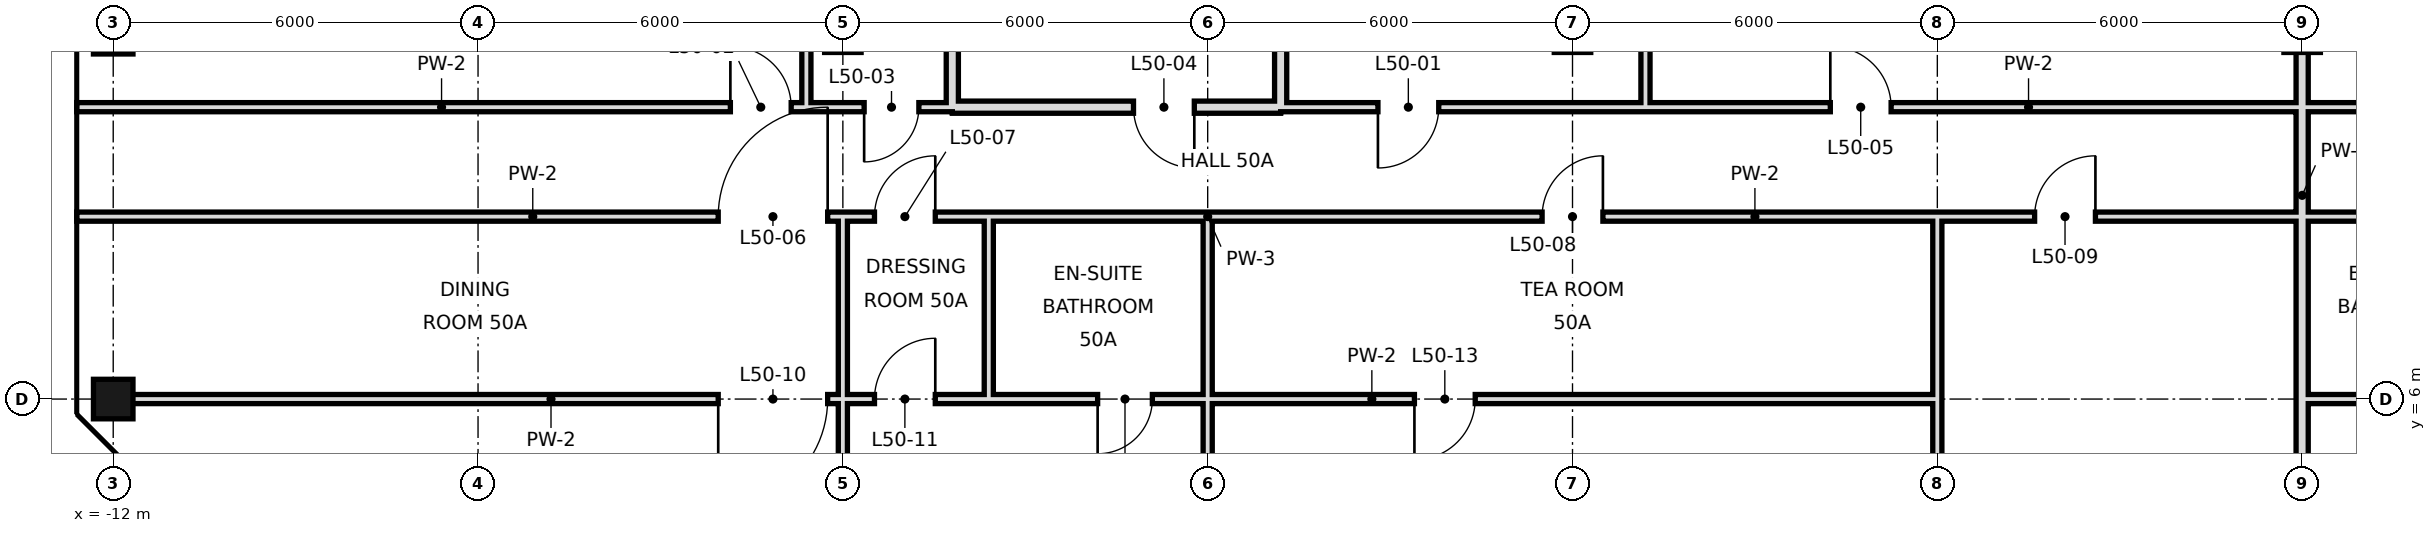
"""IFC4 building model, lengths in metres.
Left out: names, types, materials, properties, quantities, classifications, styles, units other than length and angle.
Written with IfcOpenShell. Run it as: python <this file> out.ifc"""

import sys

from ifc_helpers import new_model, si_unit, direction, frame, frame_2d, origin, origin_2d, place, context, subcontext, project, spatial, rectangle, hollow_rectangle, extrude, element, fill, save


model = new_model("IFC4")
c1 = context("Model", 3, precision=1e-05, world=origin(), true_north=direction((0.0, 1.0)))
c2 = subcontext(c1, "Body", "Model", "MODEL_VIEW")
j1 = project(units=[si_unit("LENGTHUNIT", "METRE"), si_unit("PLANEANGLEUNIT", "RADIAN")], contexts=[c1])
p1 = place(None, origin())
s1 = spatial("IfcSite", under=j1, at=p1, CompositionType="ELEMENT")
p2 = place(p1, origin())
s2 = spatial("IfcBuilding", under=s1, at=p2, CompositionType="ELEMENT")
p3 = place(p2, frame((0.0, 0.0, 215.4)))
s3 = spatial("IfcBuildingStorey", under=s2, at=p3, CompositionType="ELEMENT", Elevation=215.4)
for number, where, z_axis, x_axis in (
    (1, (-12.0, 6.0, 0.0), (0.0, 0.0, 1.0), (1.0, 0.0, 0.0)),
    (2, (-12.0, 12.0, 0.0), (0.0, 0.0, 1.0), (1.0, 0.0, 0.0)),
):
    element("IfcColumn", number, at=place(p3, frame(where, z_axis=z_axis, x_axis=x_axis)), inside=s3, PredefinedType="COLUMN", context=c2, shape_type="SweptSolid", body=[
        extrude(hollow_rectangle(XDim=0.65, YDim=0.65, WallThickness=0.032, at=origin_2d()), origin(), (0.0, 0.0, 1.0), 3.6),
    ])
p4 = place(p3, frame((-0.6, 10.8, 0.0), z_axis=(0.0, 0.0, 1.0), x_axis=(0.0, 1.0, 0.0)))
e3 = element("IfcWall", 3, at=p4, inside=s3, PredefinedType="PARTITIONING", context=c2, shape_type="SweptSolid", body=[
    extrude(rectangle(XDim=7.2, YDim=0.15, at=frame_2d((3.6, 0.0))), origin(), (0.0, 0.0, 1.0), 3.42),
])
p5 = place(p3, frame((0.0, 0.0, 0.0), z_axis=(0.0, 0.0, 1.0), x_axis=(0.0, 1.0, 0.0)))
e4 = element("IfcWall", 4, at=p5, inside=s3, PredefinedType="PARTITIONING", context=c2, shape_type="SweptSolid", body=[
    extrude(rectangle(XDim=9.0, YDim=0.15, at=frame_2d((4.5, 0.0))), origin(), (0.0, 0.0, 1.0), 2.72),
])
p6 = place(p3, frame((1.8, 10.8, 0.0), z_axis=(0.0, 0.0, 1.0), x_axis=(0.0, 1.0, 0.0)))
e5 = element("IfcWall", 5, at=p6, inside=s3, PredefinedType="SOLIDWALL", context=c2, shape_type="SweptSolid", body=[
    extrude(rectangle(XDim=7.2, YDim=0.2, at=frame_2d((3.6, 0.0))), origin(), (0.0, 0.0, 1.0), 3.42),
])
p7 = place(p3, frame((13.2, 10.8, 0.0), z_axis=(0.0, 0.0, 1.0), x_axis=(0.0, 1.0, 0.0)))
e6 = element("IfcWall", 6, at=p7, inside=s3, PredefinedType="PARTITIONING", context=c2, shape_type="SweptSolid", body=[
    extrude(rectangle(XDim=7.9, YDim=0.15, at=frame_2d((3.95, 0.0))), origin(), (0.0, 0.0, 1.0), 3.42),
])
p8 = place(p3, frame((18.0, -0.6, 0.0), z_axis=(0.0, 0.0, 1.0), x_axis=(0.0, 1.0, 0.0)))
e7 = element("IfcWall", 7, at=p8, inside=s3, PredefinedType="PARTITIONING", context=c2, shape_type="SweptSolid", body=[
    extrude(rectangle(XDim=9.6, YDim=0.15, at=frame_2d((4.8, 0.0))), origin(), (0.0, 0.0, 1.0), 2.72),
])
p9 = place(p3, frame((2.4, 6.0, 0.0), z_axis=(0.0, 0.0, 1.0), x_axis=(0.0, 1.0, 0.0)))
e8 = element("IfcWall", 8, at=p9, inside=s3, PredefinedType="PARTITIONING", context=c2, shape_type="SweptSolid", body=[
    extrude(rectangle(XDim=3.0, YDim=0.15, at=frame_2d((1.5, 0.0))), origin(), (0.0, 0.0, 1.0), 3.42),
])
p10 = place(p3, frame((24.0, 0.0, 0.0), z_axis=(0.0, 0.0, 1.0), x_axis=(0.0, 1.0, 0.0)))
e9 = element("IfcWall", 9, at=p10, inside=s3, PredefinedType="SOLIDWALL", context=c2, shape_type="SweptSolid", body=[
    extrude(rectangle(XDim=18.7, YDim=0.2, at=frame_2d((9.35, 0.0))), origin(), (0.0, 0.0, 1.0), 2.72),
])
p11 = place(p3, frame((6.0, -0.6, 0.0), z_axis=(0.0, 0.0, 1.0), x_axis=(0.0, 1.0, 0.0)))
e10 = element("IfcWall", 10, at=p11, inside=s3, PredefinedType="PARTITIONING", context=c2, shape_type="SweptSolid", body=[
    extrude(rectangle(XDim=6.6, YDim=0.15, at=frame_2d((3.3, 0.0))), origin(), (0.0, 0.0, 1.0), 2.72),
])
p12 = place(p3, frame((6.0, 6.0, 0.0), z_axis=(0.0, 0.0, 1.0), x_axis=(0.0, 1.0, 0.0)))
e11 = element("IfcWall", 11, at=p12, inside=s3, PredefinedType="PARTITIONING", context=c2, shape_type="SweptSolid", body=[
    extrude(rectangle(XDim=3.0, YDim=0.15, at=frame_2d((1.5, 0.0))), origin(), (0.0, 0.0, 1.0), 2.72),
])
p13 = place(p3, frame((7.2, 10.8, 0.0), z_axis=(0.0, 0.0, 1.0), x_axis=(0.0, 1.0, 0.0)))
e12 = element("IfcWall", 12, at=p13, inside=s3, PredefinedType="SOLIDWALL", context=c2, shape_type="SweptSolid", body=[
    extrude(rectangle(XDim=7.9, YDim=0.2, at=frame_2d((3.95, 0.0))), origin(), (0.0, 0.0, 1.0), 2.72),
])
p14 = place(p3, frame((1.8, 10.8, 0.0), z_axis=(0.0, 0.0, 1.0), x_axis=(1.0, 0.0, 0.0)))
e13 = element("IfcWall", 13, at=p14, inside=s3, PredefinedType="SOLIDWALL", context=c2, shape_type="SweptSolid", body=[
    extrude(rectangle(XDim=5.4, YDim=0.2, at=frame_2d((2.7, 0.0))), origin(), (0.0, 0.0, 1.0), 2.72),
])
p15 = place(p14, frame((2.98, 0.0, 0.0)))
e14 = element("IfcOpeningElement", 14, at=p15, cuts=e13, PredefinedType="OPENING", context=c2, shape_type="SweptSolid", body=[
    extrude(rectangle(XDim=1.0, YDim=2.4, at=frame_2d((0.5, 1.2))), frame((0.0, 0.11, 0.0), z_axis=(0.0, -1.0, 0.0), x_axis=(1.0, 0.0, 0.0)), (0.0, 0.0, 1.0), 0.22),
])
p16 = place(p3, frame((-12.6, 10.8, 0.0), z_axis=(0.0, 0.0, 1.0), x_axis=(1.0, 0.0, 0.0)))
e15 = element("IfcWall", 15, at=p16, inside=s3, PredefinedType="PARTITIONING", context=c2, shape_type="SweptSolid", body=[
    extrude(rectangle(XDim=12.0, YDim=0.15, at=frame_2d((6.0, 0.0))), origin(), (0.0, 0.0, 1.0), 3.42),
])
p17 = place(p16, frame((10.75, 0.0, 0.0)))
e16 = element("IfcOpeningElement", 16, at=p17, cuts=e15, PredefinedType="OPENING", context=c2, shape_type="SweptSolid", body=[
    extrude(rectangle(XDim=1.0, YDim=2.4, at=frame_2d((0.5, 1.2))), frame((0.0, 0.085, 0.0), z_axis=(0.0, -1.0, 0.0), x_axis=(1.0, 0.0, 0.0)), (0.0, 0.0, 1.0), 0.17),
])
p18 = place(p3, frame((7.2, 10.8, 0.0), z_axis=(0.0, 0.0, 1.0), x_axis=(1.0, 0.0, 0.0)))
e17 = element("IfcWall", 17, at=p18, inside=s3, PredefinedType="PARTITIONING", context=c2, shape_type="SweptSolid", body=[
    extrude(rectangle(XDim=24.6, YDim=0.15, at=frame_2d((12.3, 0.0))), origin(), (0.0, 0.0, 1.0), 3.42),
])
p19 = place(p18, frame((1.6, 0.0, 0.0)))
e18 = element("IfcOpeningElement", 18, at=p19, cuts=e17, PredefinedType="OPENING", context=c2, shape_type="SweptSolid", body=[
    extrude(rectangle(XDim=1.0, YDim=2.4, at=frame_2d((0.5, 1.2))), frame((0.0, 0.085, 0.0), z_axis=(0.0, -1.0, 0.0), x_axis=(1.0, 0.0, 0.0)), (0.0, 0.0, 1.0), 0.17),
])
p20 = place(p18, frame((9.04, 0.0, 0.0)))
e19 = element("IfcOpeningElement", 19, at=p20, cuts=e17, PredefinedType="OPENING", context=c2, shape_type="SweptSolid", body=[
    extrude(rectangle(XDim=1.0, YDim=2.4, at=frame_2d((0.5, 1.2))), frame((0.0, 0.085, 0.0), z_axis=(0.0, -1.0, 0.0), x_axis=(1.0, 0.0, 0.0)), (0.0, 0.0, 1.0), 0.17),
])
p21 = place(p18, frame((21.46, 0.0, 0.0)))
e20 = element("IfcOpeningElement", 20, at=p21, cuts=e17, PredefinedType="OPENING", context=c2, shape_type="SweptSolid", body=[
    extrude(rectangle(XDim=1.0, YDim=2.4, at=frame_2d((0.5, 1.2))), frame((0.0, 0.085, 0.0), z_axis=(0.0, -1.0, 0.0), x_axis=(1.0, 0.0, 0.0)), (0.0, 0.0, 1.0), 0.17),
])
p22 = place(p3, frame((-0.6, 10.8, 0.0), z_axis=(0.0, 0.0, 1.0), x_axis=(1.0, 0.0, 0.0)))
e21 = element("IfcWall", 21, at=p22, inside=s3, PredefinedType="PARTITIONING", context=c2, shape_type="SweptSolid", body=[
    extrude(rectangle(XDim=2.4, YDim=0.15, at=frame_2d((1.2, 0.0))), origin(), (0.0, 0.0, 1.0), 3.42),
])
p23 = place(p22, frame((0.95, 0.0, 0.0)))
e22 = element("IfcOpeningElement", 22, at=p23, cuts=e21, PredefinedType="OPENING", context=c2, shape_type="SweptSolid", body=[
    extrude(rectangle(XDim=0.9, YDim=2.4, at=frame_2d((0.45, 1.2))), frame((0.0, 0.085, 0.0), z_axis=(0.0, -1.0, 0.0), x_axis=(1.0, 0.0, 0.0)), (0.0, 0.0, 1.0), 0.17),
])
p24 = place(p3, frame((-12.0, 6.0, 0.0), z_axis=(0.0, 0.0, 1.0), x_axis=(1.0, 0.0, 0.0)))
e23 = element("IfcWall", 23, at=p24, inside=s3, PredefinedType="PARTITIONING", context=c2, shape_type="SweptSolid", body=[
    extrude(rectangle(XDim=14.4, YDim=0.15, at=frame_2d((7.2, 0.0))), origin(), (0.0, 0.0, 1.0), 2.72),
])
p25 = place(p24, frame((9.95, 0.0, 0.0)))
e24 = element("IfcOpeningElement", 24, at=p25, cuts=e23, PredefinedType="OPENING", context=c2, shape_type="SweptSolid", body=[
    extrude(rectangle(XDim=1.8, YDim=2.4, at=frame_2d((0.9, 1.2))), frame((0.0, 0.085, 0.0), z_axis=(0.0, -1.0, 0.0), x_axis=(1.0, 0.0, 0.0)), (0.0, 0.0, 1.0), 0.17),
])
p26 = place(p24, frame((12.52, 0.0, 0.0)))
e25 = element("IfcOpeningElement", 25, at=p26, cuts=e23, PredefinedType="OPENING", context=c2, shape_type="SweptSolid", body=[
    extrude(rectangle(XDim=1.0, YDim=2.4, at=frame_2d((0.5, 1.2))), frame((0.0, 0.085, 0.0), z_axis=(0.0, -1.0, 0.0), x_axis=(1.0, 0.0, 0.0)), (0.0, 0.0, 1.0), 0.17),
])
p27 = place(p3, frame((6.0, 6.0, 0.0), z_axis=(0.0, 0.0, 1.0), x_axis=(1.0, 0.0, 0.0)))
e26 = element("IfcWall", 26, at=p27, inside=s3, PredefinedType="PARTITIONING", context=c2, shape_type="SweptSolid", body=[
    extrude(rectangle(XDim=12.0, YDim=0.15, at=frame_2d((6.0, 0.0))), origin(), (0.0, 0.0, 1.0), 2.97),
])
p28 = place(p27, frame((3.4, 0.0, 0.0)))
e27 = element("IfcOpeningElement", 27, at=p28, cuts=e26, PredefinedType="OPENING", context=c2, shape_type="SweptSolid", body=[
    extrude(rectangle(XDim=1.0, YDim=2.4, at=frame_2d((0.5, 1.2))), frame((0.0, 0.085, 0.0), z_axis=(0.0, -1.0, 0.0), x_axis=(1.0, 0.0, 0.0)), (0.0, 0.0, 1.0), 0.17),
])
p29 = place(p3, frame((2.4, 6.0, 0.0), z_axis=(0.0, 0.0, 1.0), x_axis=(1.0, 0.0, 0.0)))
e28 = element("IfcWall", 28, at=p29, inside=s3, PredefinedType="PARTITIONING", context=c2, shape_type="SweptSolid", body=[
    extrude(rectangle(XDim=3.6, YDim=0.15, at=frame_2d((1.8, 0.0))), origin(), (0.0, 0.0, 1.0), 2.97),
])
p30 = place(p29, frame((1.79, 0.0, 0.0)))
e29 = element("IfcOpeningElement", 29, at=p30, cuts=e28, PredefinedType="OPENING", context=c2, shape_type="SweptSolid", body=[
    extrude(rectangle(XDim=0.9, YDim=2.4, at=frame_2d((0.45, 1.2))), frame((0.0, 0.085, 0.0), z_axis=(0.0, -1.0, 0.0), x_axis=(1.0, 0.0, 0.0)), (0.0, 0.0, 1.0), 0.17),
])
p31 = place(p3, frame((24.0, 6.0, 0.0), z_axis=(0.0, 0.0, 1.0), x_axis=(1.0, 0.0, 0.0)))
e30 = element("IfcWall", 30, at=p31, inside=s3, PredefinedType="PARTITIONING", context=c2, shape_type="SweptSolid", body=[
    extrude(rectangle(XDim=3.0, YDim=0.15, at=frame_2d((1.5, 0.0))), origin(), (0.0, 0.0, 1.0), 2.97),
])
p32 = place(p31, frame((1.85, 0.0, 0.0)))
e31 = element("IfcOpeningElement", 31, at=p32, cuts=e30, PredefinedType="OPENING", context=c2, shape_type="SweptSolid", body=[
    extrude(rectangle(XDim=0.9, YDim=2.4, at=frame_2d((0.45, 1.2))), frame((0.0, 0.085, 0.0), z_axis=(0.0, -1.0, 0.0), x_axis=(1.0, 0.0, 0.0)), (0.0, 0.0, 1.0), 0.17),
])
p33 = place(p3, frame((-12.6, 9.0, 0.0), z_axis=(0.0, 0.0, 1.0), x_axis=(1.0, 0.0, 0.0)))
e32 = element("IfcWall", 32, at=p33, inside=s3, PredefinedType="PARTITIONING", context=c2, shape_type="SweptSolid", body=[
    extrude(rectangle(XDim=15.0, YDim=0.15, at=frame_2d((7.5, 0.0))), origin(), (0.0, 0.0, 1.0), 3.42),
])
p34 = place(p33, frame((10.55, 0.0, 0.0)))
e33 = element("IfcOpeningElement", 33, at=p34, cuts=e32, PredefinedType="OPENING", context=c2, shape_type="SweptSolid", body=[
    extrude(rectangle(XDim=1.8, YDim=2.4, at=frame_2d((0.9, 1.2))), frame((0.0, 0.085, 0.0), z_axis=(0.0, -1.0, 0.0), x_axis=(1.0, 0.0, 0.0)), (0.0, 0.0, 1.0), 0.17),
])
p35 = place(p33, frame((13.12, 0.0, 0.0)))
e34 = element("IfcOpeningElement", 34, at=p35, cuts=e32, PredefinedType="OPENING", context=c2, shape_type="SweptSolid", body=[
    extrude(rectangle(XDim=1.0, YDim=2.4, at=frame_2d((0.5, 1.2))), frame((0.0, 0.085, 0.0), z_axis=(0.0, -1.0, 0.0), x_axis=(1.0, 0.0, 0.0)), (0.0, 0.0, 1.0), 0.17),
])
p36 = place(p3, frame((6.0, 9.0, 0.0), z_axis=(0.0, 0.0, 1.0), x_axis=(1.0, 0.0, 0.0)))
e35 = element("IfcWall", 35, at=p36, inside=s3, PredefinedType="PARTITIONING", context=c2, shape_type="SweptSolid", body=[
    extrude(rectangle(XDim=18.0, YDim=0.15, at=frame_2d((9.0, 0.0))), origin(), (0.0, 0.0, 1.0), 3.42),
])
p37 = place(p36, frame((5.5, 0.0, 0.0)))
e36 = element("IfcOpeningElement", 36, at=p37, cuts=e35, PredefinedType="OPENING", context=c2, shape_type="SweptSolid", body=[
    extrude(rectangle(XDim=1.0, YDim=2.4, at=frame_2d((0.5, 1.2))), frame((0.0, 0.085, 0.0), z_axis=(0.0, -1.0, 0.0), x_axis=(1.0, 0.0, 0.0)), (0.0, 0.0, 1.0), 0.17),
])
p38 = place(p36, frame((13.6, 0.0, 0.0)))
e37 = element("IfcOpeningElement", 37, at=p38, cuts=e35, PredefinedType="OPENING", context=c2, shape_type="SweptSolid", body=[
    extrude(rectangle(XDim=1.0, YDim=2.4, at=frame_2d((0.5, 1.2))), frame((0.0, 0.085, 0.0), z_axis=(0.0, -1.0, 0.0), x_axis=(1.0, 0.0, 0.0)), (0.0, 0.0, 1.0), 0.17),
])
p39 = place(p3, frame((2.4, 9.0, 0.0), z_axis=(0.0, 0.0, 1.0), x_axis=(1.0, 0.0, 0.0)))
e38 = element("IfcWall", 38, at=p39, inside=s3, PredefinedType="PARTITIONING", context=c2, shape_type="SweptSolid", body=[
    extrude(rectangle(XDim=3.6, YDim=0.15, at=frame_2d((1.8, 0.0))), origin(), (0.0, 0.0, 1.0), 3.42),
])
p40 = place(p3, frame((24.0, 9.0, 0.0), z_axis=(0.0, 0.0, 1.0), x_axis=(1.0, 0.0, 0.0)))
e39 = element("IfcWall", 39, at=p40, inside=s3, PredefinedType="PARTITIONING", context=c2, shape_type="SweptSolid", body=[
    extrude(rectangle(XDim=3.0, YDim=0.15, at=frame_2d((1.5, 0.0))), origin(), (0.0, 0.0, 1.0), 3.42),
])
p41 = place(p19, frame((1.0, 0.0, 0.0), z_axis=(0.0, 0.0, 1.0), x_axis=(-1.0, 0.0, 0.0)))
e40 = element("IfcDoor", 40, at=p41, inside=s3, OperationType="SINGLE_SWING_RIGHT", PredefinedType="DOOR", context=c2, shape_type="SweptSolid", body=[
    extrude(rectangle(XDim=1.0, YDim=2.4, at=frame_2d((0.5, 1.2))), frame((0.0, 0.025, 0.0), z_axis=(0.0, -1.0, 0.0), x_axis=(1.0, 0.0, 0.0)), (0.0, 0.0, 1.0), 0.05),
])
fill(e18, e40)
p42 = place(p17, origin())
e41 = element("IfcDoor", 41, at=p42, inside=s3, OperationType="SINGLE_SWING_LEFT", PredefinedType="DOOR", context=c2, shape_type="SweptSolid", body=[
    extrude(rectangle(XDim=1.0, YDim=2.4, at=frame_2d((0.5, 1.2))), frame((0.0, 0.025, 0.0), z_axis=(0.0, -1.0, 0.0), x_axis=(1.0, 0.0, 0.0)), (0.0, 0.0, 1.0), 0.05),
])
fill(e16, e41)
p43 = place(p23, frame((0.9, 0.0, 0.0), z_axis=(0.0, 0.0, 1.0), x_axis=(-1.0, 0.0, 0.0)))
e42 = element("IfcDoor", 42, at=p43, inside=s3, OperationType="SINGLE_SWING_RIGHT", PredefinedType="DOOR", context=c2, shape_type="SweptSolid", body=[
    extrude(rectangle(XDim=0.9, YDim=2.4, at=frame_2d((0.45, 1.2))), frame((0.0, 0.025, 0.0), z_axis=(0.0, -1.0, 0.0), x_axis=(1.0, 0.0, 0.0)), (0.0, 0.0, 1.0), 0.05),
])
fill(e22, e42)
p44 = place(p15, origin())
e43 = element("IfcDoor", 43, at=p44, inside=s3, OperationType="SINGLE_SWING_RIGHT", PredefinedType="DOOR", context=c2, shape_type="SweptSolid", body=[
    extrude(rectangle(XDim=1.0, YDim=2.4, at=frame_2d((0.5, 1.2))), frame((0.0, 0.025, 0.0), z_axis=(0.0, -1.0, 0.0), x_axis=(1.0, 0.0, 0.0)), (0.0, 0.0, 1.0), 0.05),
])
fill(e14, e43)
p45 = place(p20, origin())
e44 = element("IfcDoor", 44, at=p45, inside=s3, OperationType="SINGLE_SWING_LEFT", PredefinedType="DOOR", context=c2, shape_type="SweptSolid", body=[
    extrude(rectangle(XDim=1.0, YDim=2.4, at=frame_2d((0.5, 1.2))), frame((0.0, 0.025, 0.0), z_axis=(0.0, -1.0, 0.0), x_axis=(1.0, 0.0, 0.0)), (0.0, 0.0, 1.0), 0.05),
])
fill(e19, e44)
p46 = place(p34, frame((1.8, 0.0, 0.0), z_axis=(0.0, 0.0, 1.0), x_axis=(-1.0, 0.0, 0.0)))
e45 = element("IfcDoor", 45, at=p46, inside=s3, OperationType="SINGLE_SWING_LEFT", PredefinedType="DOOR", context=c2, shape_type="SweptSolid", body=[
    extrude(rectangle(XDim=1.8, YDim=2.4, at=frame_2d((0.9, 1.2))), frame((0.0, 0.025, 0.0), z_axis=(0.0, -1.0, 0.0), x_axis=(1.0, 0.0, 0.0)), (0.0, 0.0, 1.0), 0.05),
])
fill(e33, e45)
p47 = place(p35, frame((1.0, 0.0, 0.0), z_axis=(0.0, 0.0, 1.0), x_axis=(-1.0, 0.0, 0.0)))
e46 = element("IfcDoor", 46, at=p47, inside=s3, OperationType="SINGLE_SWING_LEFT", PredefinedType="DOOR", context=c2, shape_type="SweptSolid", body=[
    extrude(rectangle(XDim=1.0, YDim=2.4, at=frame_2d((0.5, 1.2))), frame((0.0, 0.025, 0.0), z_axis=(0.0, -1.0, 0.0), x_axis=(1.0, 0.0, 0.0)), (0.0, 0.0, 1.0), 0.05),
])
fill(e34, e46)
p48 = place(p37, frame((1.0, 0.0, 0.0), z_axis=(0.0, 0.0, 1.0), x_axis=(-1.0, 0.0, 0.0)))
e47 = element("IfcDoor", 47, at=p48, inside=s3, OperationType="SINGLE_SWING_LEFT", PredefinedType="DOOR", context=c2, shape_type="SweptSolid", body=[
    extrude(rectangle(XDim=1.0, YDim=2.4, at=frame_2d((0.5, 1.2))), frame((0.0, 0.025, 0.0), z_axis=(0.0, -1.0, 0.0), x_axis=(1.0, 0.0, 0.0)), (0.0, 0.0, 1.0), 0.05),
])
fill(e36, e47)
p49 = place(p38, frame((1.0, 0.0, 0.0), z_axis=(0.0, 0.0, 1.0), x_axis=(-1.0, 0.0, 0.0)))
e48 = element("IfcDoor", 48, at=p49, inside=s3, OperationType="SINGLE_SWING_LEFT", PredefinedType="DOOR", context=c2, shape_type="SweptSolid", body=[
    extrude(rectangle(XDim=1.0, YDim=2.4, at=frame_2d((0.5, 1.2))), frame((0.0, 0.025, 0.0), z_axis=(0.0, -1.0, 0.0), x_axis=(1.0, 0.0, 0.0)), (0.0, 0.0, 1.0), 0.05),
])
fill(e37, e48)
p50 = place(p25, frame((1.8, 0.0, 0.0), z_axis=(0.0, 0.0, 1.0), x_axis=(-1.0, 0.0, 0.0)))
e49 = element("IfcDoor", 49, at=p50, inside=s3, OperationType="SINGLE_SWING_RIGHT", PredefinedType="DOOR", context=c2, shape_type="SweptSolid", body=[
    extrude(rectangle(XDim=1.8, YDim=2.4, at=frame_2d((0.9, 1.2))), frame((0.0, 0.025, 0.0), z_axis=(0.0, -1.0, 0.0), x_axis=(1.0, 0.0, 0.0)), (0.0, 0.0, 1.0), 0.05),
])
fill(e24, e49)
p51 = place(p26, frame((1.0, 0.0, 0.0), z_axis=(0.0, 0.0, 1.0), x_axis=(-1.0, 0.0, 0.0)))
e50 = element("IfcDoor", 50, at=p51, inside=s3, OperationType="SINGLE_SWING_LEFT", PredefinedType="DOOR", context=c2, shape_type="SweptSolid", body=[
    extrude(rectangle(XDim=1.0, YDim=2.4, at=frame_2d((0.5, 1.2))), frame((0.0, 0.025, 0.0), z_axis=(0.0, -1.0, 0.0), x_axis=(1.0, 0.0, 0.0)), (0.0, 0.0, 1.0), 0.05),
])
fill(e25, e50)
p52 = place(p30, frame((0.9, 0.0, 0.0), z_axis=(0.0, 0.0, 1.0), x_axis=(-1.0, 0.0, 0.0)))
e51 = element("IfcDoor", 51, at=p52, inside=s3, OperationType="SINGLE_SWING_RIGHT", PredefinedType="DOOR", context=c2, shape_type="SweptSolid", body=[
    extrude(rectangle(XDim=0.9, YDim=2.4, at=frame_2d((0.45, 1.2))), frame((0.0, 0.025, 0.0), z_axis=(0.0, -1.0, 0.0), x_axis=(1.0, 0.0, 0.0)), (0.0, 0.0, 1.0), 0.05),
])
fill(e29, e51)
p53 = place(p28, frame((1.0, 0.0, 0.0), z_axis=(0.0, 0.0, 1.0), x_axis=(-1.0, 0.0, 0.0)))
e52 = element("IfcDoor", 52, at=p53, inside=s3, OperationType="SINGLE_SWING_RIGHT", PredefinedType="DOOR", context=c2, shape_type="SweptSolid", body=[
    extrude(rectangle(XDim=1.0, YDim=2.4, at=frame_2d((0.5, 1.2))), frame((0.0, 0.025, 0.0), z_axis=(0.0, -1.0, 0.0), x_axis=(1.0, 0.0, 0.0)), (0.0, 0.0, 1.0), 0.05),
])
fill(e27, e52)
save(model, sys.argv[1])
